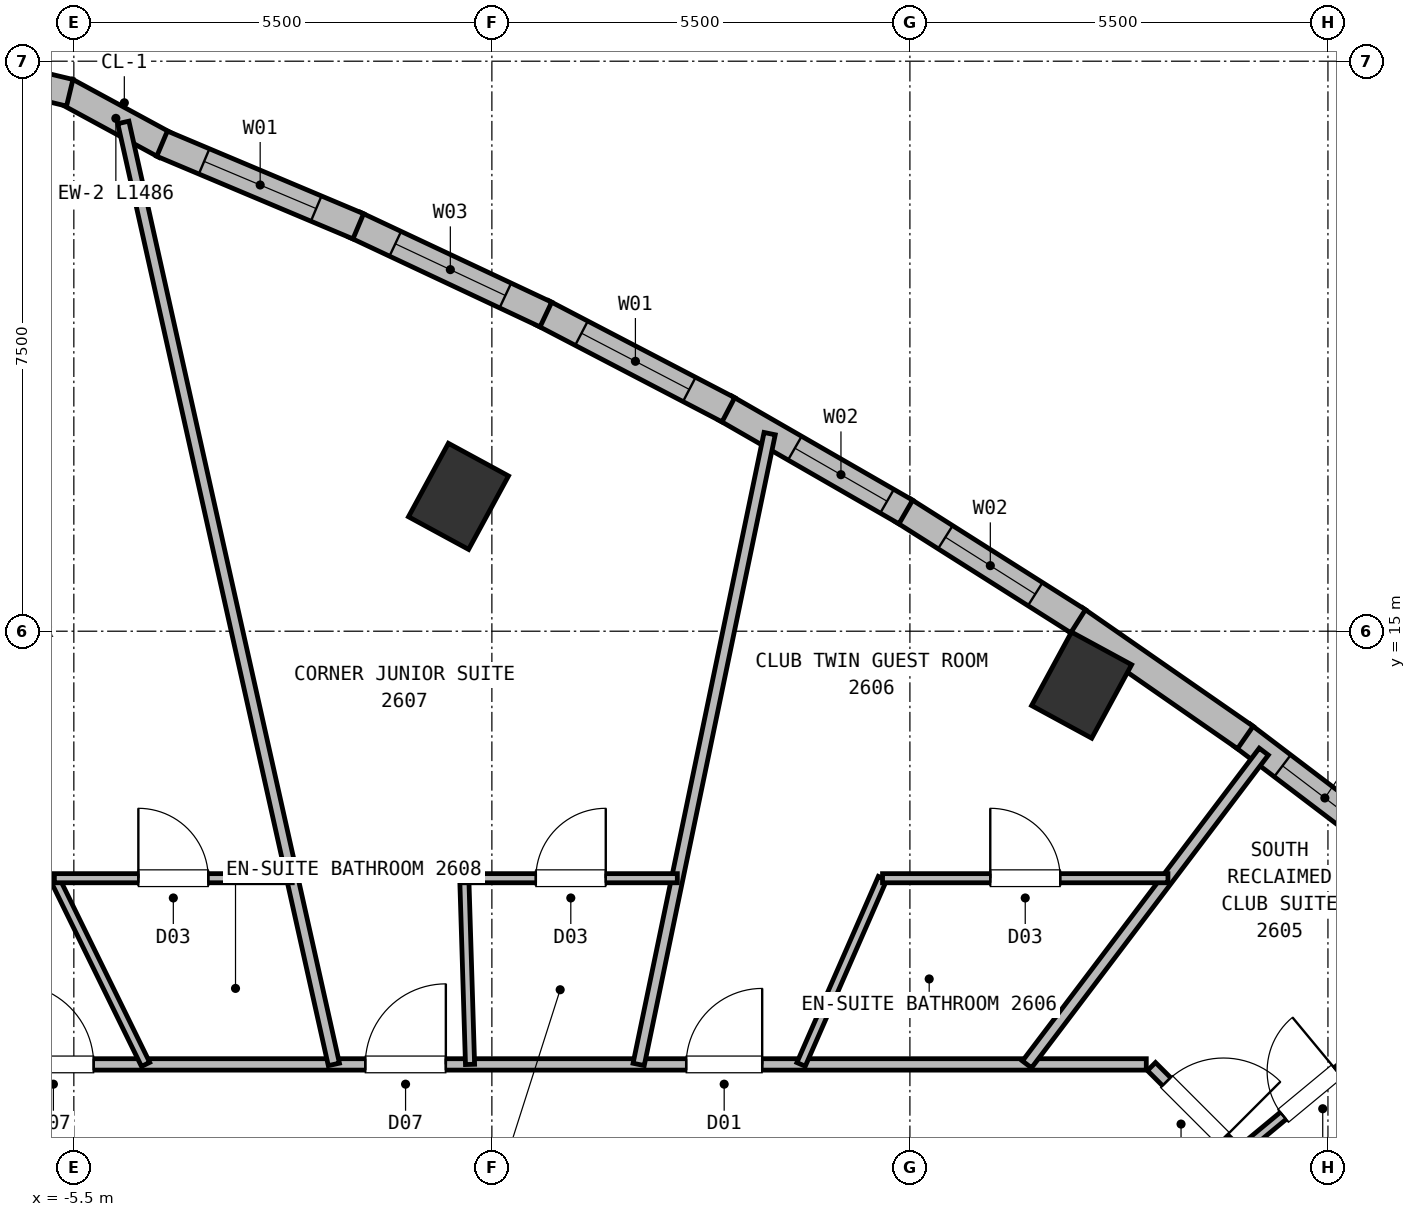
"""IFC4 building model, lengths in metres.
Left out: names, types, materials, properties, quantities, classifications, styles, units other than length and angle.
Written with IfcOpenShell. Run it as: python <this file> out.ifc"""

import sys

from ifc_helpers import new_model, si_unit, direction, frame, frame_2d, origin, origin_2d, place, context, subcontext, project, spatial, rectangle, extrude, element, fill, save


model = new_model("IFC4")
c1 = context("Model", 3, precision=1e-05, world=origin(), true_north=direction((0.0, 1.0)))
c2 = subcontext(c1, "Body", "Model", "MODEL_VIEW")
j1 = project(units=[si_unit("LENGTHUNIT", "METRE"), si_unit("PLANEANGLEUNIT", "RADIAN")], contexts=[c1])
p1 = place(None, origin())
s1 = spatial("IfcSite", under=j1, at=p1, CompositionType="ELEMENT")
p2 = place(p1, origin())
s2 = spatial("IfcBuilding", under=s1, at=p2, CompositionType="ELEMENT")
p3 = place(p2, frame((0.0, 0.0, 97.25)))
s3 = spatial("IfcBuildingStorey", under=s2, at=p3, CompositionType="ELEMENT", Elevation=97.25)
for number, where, z_axis, x_axis in (
    (1, (7.759, 14.29, 0.0), (0.0, 0.0, 1.0), (-0.879, 0.477, 0.0)),
    (2, (-0.439, 16.774, 0.0), (0.0, 0.0, 1.0), (-0.879, 0.477, 0.0)),
):
    element("IfcColumn", number, at=place(p3, frame(where, z_axis=z_axis, x_axis=x_axis)), inside=s3, PredefinedType="COLUMN", context=c2, shape_type="SweptSolid", body=[
        extrude(rectangle(XDim=0.9, YDim=1.1, at=origin_2d()), origin(), (0.0, 0.0, 1.0), 3.75),
    ])
for number, where, z_axis, x_axis in (
    (3, (-5.6, 22.102, 0.0), (0.0, 0.0, 1.0), (0.879, -0.477, 0.0)),
    (4, (-6.999, 22.431, 0.0), (0.0, 0.0, 1.0), (0.972, -0.233, 0.0)),
):
    element("IfcWall", number, at=place(p3, frame(where, z_axis=z_axis, x_axis=x_axis)), inside=s3, PredefinedType="SOLIDWALL", context=c2, shape_type="SweptSolid", body=[
        extrude(rectangle(XDim=1.486, YDim=0.36, at=frame_2d((0.743, 0.0))), origin(), (0.0, 0.0, 1.0), 3.5),
    ])
p4 = place(p3, frame((9.873, 13.631, 0.0), z_axis=(0.0, 0.0, 1.0), x_axis=(0.796336225349, -0.604854210696, 0.0)))
e5 = element("IfcWall", 5, at=p4, inside=s3, PredefinedType="SOLIDWALL", context=c2, shape_type="SweptSolid", body=[
    extrude(rectangle(XDim=2.73, YDim=0.36, at=frame_2d((1.365, 0.0))), origin(), (0.0, 0.0, 1.0), 3.5),
])
p5 = place(p4, frame((0.665, 0.0, 0.72)))
e6 = element("IfcOpeningElement", 6, at=p5, cuts=e5, PredefinedType="OPENING", context=c2, shape_type="SweptSolid", body=[
    extrude(rectangle(XDim=1.4, YDim=1.84, at=frame_2d((0.7, 0.92))), frame((0.0, 0.19, 0.0), z_axis=(0.0, -1.0, 0.0), x_axis=(1.0, 0.0, 0.0)), (0.0, 0.0, 1.0), 0.38),
])
p6 = place(p3, frame((7.671, 15.159, 0.0), z_axis=(0.0, 0.0, 1.0), x_axis=(0.821331552378, -0.570451120665, 0.0)))
e7 = element("IfcWall", 7, at=p6, inside=s3, PredefinedType="SOLIDWALL", context=c2, shape_type="SweptSolid", body=[
    extrude(rectangle(XDim=2.73, YDim=0.36, at=frame_2d((1.365, 0.0))), origin(), (0.0, 0.0, 1.0), 3.5),
])
p7 = place(p3, frame((5.403, 16.594, 0.0), z_axis=(0.0, 0.0, 1.0), x_axis=(0.844802931873, -0.535077570357, 0.0)))
e8 = element("IfcWall", 8, at=p7, inside=s3, PredefinedType="SOLIDWALL", context=c2, shape_type="SweptSolid", body=[
    extrude(rectangle(XDim=2.734, YDim=0.36, at=frame_2d((1.367, 0.0))), origin(), (0.0, 0.0, 1.0), 3.5),
])
p8 = place(p7, frame((0.667, 0.0, 0.72)))
e9 = element("IfcOpeningElement", 9, at=p8, cuts=e8, PredefinedType="OPENING", context=c2, shape_type="SweptSolid", body=[
    extrude(rectangle(XDim=1.4, YDim=1.84, at=frame_2d((0.7, 0.92))), frame((0.0, 0.19, 0.0), z_axis=(0.0, -1.0, 0.0), x_axis=(1.0, 0.0, 0.0)), (0.0, 0.0, 1.0), 0.38),
])
p9 = place(p3, frame((3.068, 17.938, 0.0), z_axis=(0.0, 0.0, 1.0), x_axis=(0.866601472799, -0.499000889121, 0.0)))
e10 = element("IfcWall", 10, at=p9, inside=s3, PredefinedType="SOLIDWALL", context=c2, shape_type="SweptSolid", body=[
    extrude(rectangle(XDim=2.744, YDim=0.36, at=frame_2d((1.372, 0.0))), origin(), (0.0, 0.0, 1.0), 3.5),
])
p10 = place(p9, frame((1.06, 0.0, 0.72)))
e11 = element("IfcOpeningElement", 11, at=p10, cuts=e10, PredefinedType="OPENING", context=c2, shape_type="SweptSolid", body=[
    extrude(rectangle(XDim=1.4, YDim=1.84, at=frame_2d((0.7, 0.92))), frame((0.0, 0.19, 0.0), z_axis=(0.0, -1.0, 0.0), x_axis=(1.0, 0.0, 0.0)), (0.0, 0.0, 1.0), 0.38),
])
p11 = place(p3, frame((0.666, 19.189, 0.0), z_axis=(0.0, 0.0, 1.0), x_axis=(0.886704748188, -0.462336121822, 0.0)))
e12 = element("IfcWall", 12, at=p11, inside=s3, PredefinedType="SOLIDWALL", context=c2, shape_type="SweptSolid", body=[
    extrude(rectangle(XDim=2.759, YDim=0.36, at=frame_2d((1.379, 0.0))), origin(), (0.0, 0.0, 1.0), 3.5),
])
p12 = place(p11, frame((0.579, 0.0, 0.72)))
e13 = element("IfcOpeningElement", 13, at=p12, cuts=e12, PredefinedType="OPENING", context=c2, shape_type="SweptSolid", body=[
    extrude(rectangle(XDim=1.6, YDim=1.88, at=frame_2d((0.8, 0.94))), frame((0.0, 0.19, 0.0), z_axis=(0.0, -1.0, 0.0), x_axis=(1.0, 0.0, 0.0)), (0.0, 0.0, 1.0), 0.38),
])
p13 = place(p3, frame((-1.803, 20.348, 0.0), z_axis=(0.0, 0.0, 1.0), x_axis=(0.905061598697, -0.425280498688, 0.0)))
e14 = element("IfcWall", 14, at=p13, inside=s3, PredefinedType="SOLIDWALL", context=c2, shape_type="SweptSolid", body=[
    extrude(rectangle(XDim=2.777, YDim=0.36, at=frame_2d((1.389, 0.0))), origin(), (0.0, 0.0, 1.0), 3.5),
])
p14 = place(p13, frame((0.589, 0.0, 0.72)))
e15 = element("IfcOpeningElement", 15, at=p14, cuts=e14, PredefinedType="OPENING", context=c2, shape_type="SweptSolid", body=[
    extrude(rectangle(XDim=1.6, YDim=1.88, at=frame_2d((0.8, 0.94))), frame((0.0, 0.19, 0.0), z_axis=(0.0, -1.0, 0.0), x_axis=(1.0, 0.0, 0.0)), (0.0, 0.0, 1.0), 0.38),
])
p15 = place(p3, frame((-4.339, 21.415, 0.0), z_axis=(0.0, 0.0, 1.0), x_axis=(0.921579586259, -0.388189472025, 0.0)))
e16 = element("IfcWall", 16, at=p15, inside=s3, PredefinedType="SOLIDWALL", context=c2, shape_type="SweptSolid", body=[
    extrude(rectangle(XDim=2.801, YDim=0.36, at=frame_2d((1.401, 0.0))), origin(), (0.0, 0.0, 1.0), 3.5),
])
p16 = place(p15, frame((0.601, 0.0, 0.72)))
e17 = element("IfcOpeningElement", 17, at=p16, cuts=e16, PredefinedType="OPENING", context=c2, shape_type="SweptSolid", body=[
    extrude(rectangle(XDim=1.6, YDim=1.88, at=frame_2d((0.8, 0.94))), frame((0.0, 0.19, 0.0), z_axis=(0.0, -1.0, 0.0), x_axis=(1.0, 0.0, 0.0)), (0.0, 0.0, 1.0), 0.38),
])
p17 = place(p3, frame((8.678, 9.272, 0.0), z_axis=(0.0, 0.0, 1.0), x_axis=(0.707106781187, -0.707106781187, 0.0)))
e18 = element("IfcWall", 18, at=p17, inside=s3, PredefinedType="PARTITIONING", context=c2, shape_type="SweptSolid", body=[
    extrude(rectangle(XDim=2.89, YDim=0.15, at=frame_2d((1.445, 0.0))), origin(), (0.0, 0.0, 1.0), 3.5),
])
p18 = place(p17, frame((0.28, 0.0, 0.0)))
e19 = element("IfcOpeningElement", 19, at=p18, cuts=e18, PredefinedType="OPENING", context=c2, shape_type="SweptSolid", body=[
    extrude(rectangle(XDim=1.06, YDim=2.15, at=frame_2d((0.53, 1.075))), frame((0.0, 0.085, 0.0), z_axis=(0.0, -1.0, 0.0), x_axis=(1.0, 0.0, 0.0)), (0.0, 0.0, 1.0), 0.17),
])
p19 = place(p3, frame((-8.61, 9.3, 0.0), z_axis=(0.0, 0.0, 1.0), x_axis=(1.0, 0.0, 0.0)))
e20 = element("IfcWall", 20, at=p19, inside=s3, PredefinedType="PARTITIONING", context=c2, shape_type="SweptSolid", body=[
    extrude(rectangle(XDim=17.22, YDim=0.15, at=frame_2d((8.61, 0.0))), origin(), (0.0, 0.0, 1.0), 3.5),
])
p20 = place(p19, frame((11.167, 0.0, 0.0)))
e21 = element("IfcOpeningElement", 21, at=p20, cuts=e20, PredefinedType="OPENING", context=c2, shape_type="SweptSolid", body=[
    extrude(rectangle(XDim=1.0, YDim=2.15, at=frame_2d((0.5, 1.075))), frame((0.0, 0.085, 0.0), z_axis=(0.0, -1.0, 0.0), x_axis=(1.0, 0.0, 0.0)), (0.0, 0.0, 1.0), 0.17),
])
p21 = place(p19, frame((6.944, 0.0, 0.0)))
e22 = element("IfcOpeningElement", 22, at=p21, cuts=e20, PredefinedType="OPENING", context=c2, shape_type="SweptSolid", body=[
    extrude(rectangle(XDim=1.06, YDim=2.15, at=frame_2d((0.53, 1.075))), frame((0.0, 0.085, 0.0), z_axis=(0.0, -1.0, 0.0), x_axis=(1.0, 0.0, 0.0)), (0.0, 0.0, 1.0), 0.17),
])
p22 = place(p19, frame((2.311, 0.0, 0.0)))
e23 = element("IfcOpeningElement", 23, at=p22, cuts=e20, PredefinedType="OPENING", context=c2, shape_type="SweptSolid", body=[
    extrude(rectangle(XDim=1.06, YDim=2.15, at=frame_2d((0.53, 1.075))), frame((0.0, 0.085, 0.0), z_axis=(0.0, -1.0, 0.0), x_axis=(1.0, 0.0, 0.0)), (0.0, 0.0, 1.0), 0.17),
])
p23 = place(p3, frame((9.818, 8.132, 0.0), z_axis=(0.0, 0.0, 1.0), x_axis=(0.770088402747, 0.63793718496, 0.0)))
e24 = element("IfcWall", 24, at=p23, inside=s3, PredefinedType="PARTITIONING", context=c2, shape_type="SweptSolid", body=[
    extrude(rectangle(XDim=2.461, YDim=0.12, at=frame_2d((1.23, 0.0))), origin(), (0.0, 0.0, 1.0), 3.5),
])
p24 = place(p23, frame((0.771, 0.0, 0.0)))
e25 = element("IfcOpeningElement", 25, at=p24, cuts=e24, PredefinedType="OPENING", context=c2, shape_type="SweptSolid", body=[
    extrude(rectangle(XDim=0.92, YDim=2.1, at=frame_2d((0.46, 1.05))), frame((0.0, 0.07, 0.0), z_axis=(0.0, -1.0, 0.0), x_axis=(1.0, 0.0, 0.0)), (0.0, 0.0, 1.0), 0.14),
])
p25 = place(p3, frame((7.04, 9.3, 0.0), z_axis=(0.0, 0.0, 1.0), x_axis=(0.603580834167, 0.797301810249, 0.0)))
e26 = element("IfcWall", 26, at=p25, inside=s3, PredefinedType="PARTITIONING", context=c2, shape_type="SweptSolid", body=[
    extrude(rectangle(XDim=5.162, YDim=0.15, at=frame_2d((2.581, 0.0))), origin(), (0.0, 0.0, 1.0), 3.5),
])
p26 = place(p3, frame((4.068, 9.3, 0.0), z_axis=(0.0, 0.0, 1.0), x_axis=(0.400794887066, 0.916167811322, 0.0)))
e27 = element("IfcWall", 27, at=p26, inside=s3, PredefinedType="PARTITIONING", context=c2, shape_type="SweptSolid", body=[
    extrude(rectangle(XDim=2.674, YDim=0.12, at=frame_2d((1.337, 0.0))), origin(), (0.0, 0.0, 1.0), 3.5),
])
p27 = place(p3, frame((5.14, 11.75, 0.0), z_axis=(0.0, 0.0, 1.0), x_axis=(1.0, 0.0, 0.0)))
e28 = element("IfcWall", 28, at=p27, inside=s3, PredefinedType="PARTITIONING", context=c2, shape_type="SweptSolid", body=[
    extrude(rectangle(XDim=3.755, YDim=0.12, at=frame_2d((1.877, 0.0))), origin(), (0.0, 0.0, 1.0), 3.5),
])
p28 = place(p27, frame((1.417, 0.0, 0.0)))
e29 = element("IfcOpeningElement", 29, at=p28, cuts=e28, PredefinedType="OPENING", context=c2, shape_type="SweptSolid", body=[
    extrude(rectangle(XDim=0.92, YDim=2.1, at=frame_2d((0.46, 1.05))), frame((0.0, 0.07, 0.0), z_axis=(0.0, -1.0, 0.0), x_axis=(1.0, 0.0, 0.0)), (0.0, 0.0, 1.0), 0.14),
])
p29 = place(p3, frame((1.931, 9.3, 0.0), z_axis=(0.0, 0.0, 1.0), x_axis=(0.203305542184, 0.979115343827, 0.0)))
e30 = element("IfcWall", 30, at=p29, inside=s3, PredefinedType="PARTITIONING", context=c2, shape_type="SweptSolid", body=[
    extrude(rectangle(XDim=8.477, YDim=0.15, at=frame_2d((4.238, 0.0))), origin(), (0.0, 0.0, 1.0), 3.5),
])
p30 = place(p3, frame((-0.287, 9.3, 0.0), z_axis=(0.0, 0.0, 1.0), x_axis=(-0.030877148781, 0.999523187166, 0.0)))
e31 = element("IfcWall", 31, at=p30, inside=s3, PredefinedType="PARTITIONING", context=c2, shape_type="SweptSolid", body=[
    extrude(rectangle(XDim=2.451, YDim=0.12, at=frame_2d((1.226, 0.0))), origin(), (0.0, 0.0, 1.0), 3.5),
])
p31 = place(p3, frame((-0.363, 11.75, 0.0), z_axis=(0.0, 0.0, 1.0), x_axis=(1.0, 0.0, 0.0)))
e32 = element("IfcWall", 32, at=p31, inside=s3, PredefinedType="PARTITIONING", context=c2, shape_type="SweptSolid", body=[
    extrude(rectangle(XDim=2.803, YDim=0.12, at=frame_2d((1.401, 0.0))), origin(), (0.0, 0.0, 1.0), 3.5),
])
p32 = place(p31, frame((0.941, 0.0, 0.0)))
e33 = element("IfcOpeningElement", 33, at=p32, cuts=e32, PredefinedType="OPENING", context=c2, shape_type="SweptSolid", body=[
    extrude(rectangle(XDim=0.92, YDim=2.1, at=frame_2d((0.46, 1.05))), frame((0.0, 0.07, 0.0), z_axis=(0.0, -1.0, 0.0), x_axis=(1.0, 0.0, 0.0)), (0.0, 0.0, 1.0), 0.14),
])
p33 = place(p3, frame((-2.079, 9.3, 0.0), z_axis=(0.0, 0.0, 1.0), x_axis=(-0.218143379007, 0.975916731179, 0.0)))
e34 = element("IfcWall", 34, at=p33, inside=s3, PredefinedType="PARTITIONING", context=c2, shape_type="SweptSolid", body=[
    extrude(rectangle(XDim=12.7, YDim=0.15, at=frame_2d((6.35, 0.0))), origin(), (0.0, 0.0, 1.0), 3.5),
])
p34 = place(p3, frame((-5.756, 11.75, 0.0), z_axis=(0.0, 0.0, 1.0), x_axis=(0.439932257938, -0.898030961841, 0.0)))
e35 = element("IfcWall", 35, at=p34, inside=s3, PredefinedType="PARTITIONING", context=c2, shape_type="SweptSolid", body=[
    extrude(rectangle(XDim=2.728, YDim=0.12, at=frame_2d((1.364, 0.0))), origin(), (0.0, 0.0, 1.0), 3.5),
])
p35 = place(p3, frame((-5.756, 11.75, 0.0), z_axis=(0.0, 0.0, 1.0), x_axis=(1.0, 0.0, 0.0)))
e36 = element("IfcWall", 36, at=p35, inside=s3, PredefinedType="PARTITIONING", context=c2, shape_type="SweptSolid", body=[
    extrude(rectangle(XDim=3.13, YDim=0.12, at=frame_2d((1.565, 0.0))), origin(), (0.0, 0.0, 1.0), 3.5),
])
p36 = place(p35, frame((1.105, 0.0, 0.0)))
e37 = element("IfcOpeningElement", 37, at=p36, cuts=e36, PredefinedType="OPENING", context=c2, shape_type="SweptSolid", body=[
    extrude(rectangle(XDim=0.92, YDim=2.1, at=frame_2d((0.46, 1.05))), frame((0.0, 0.07, 0.0), z_axis=(0.0, -1.0, 0.0), x_axis=(1.0, 0.0, 0.0)), (0.0, 0.0, 1.0), 0.14),
])
p37 = place(p5, origin())
e38 = element("IfcWindow", 38, at=p37, inside=s3, PartitioningType="SINGLE_PANEL", PredefinedType="WINDOW", context=c2, shape_type="SweptSolid", body=[
    extrude(rectangle(XDim=1.4, YDim=1.84, at=frame_2d((0.7, 0.92))), frame((0.0, 0.03, 0.0), z_axis=(0.0, -1.0, 0.0), x_axis=(1.0, 0.0, 0.0)), (0.0, 0.0, 1.0), 0.06),
])
fill(e6, e38)
p38 = place(p8, origin())
e39 = element("IfcWindow", 39, at=p38, inside=s3, PartitioningType="SINGLE_PANEL", PredefinedType="WINDOW", context=c2, shape_type="SweptSolid", body=[
    extrude(rectangle(XDim=1.4, YDim=1.84, at=frame_2d((0.7, 0.92))), frame((0.0, 0.03, 0.0), z_axis=(0.0, -1.0, 0.0), x_axis=(1.0, 0.0, 0.0)), (0.0, 0.0, 1.0), 0.06),
])
fill(e9, e39)
p39 = place(p10, origin())
e40 = element("IfcWindow", 40, at=p39, inside=s3, PartitioningType="SINGLE_PANEL", PredefinedType="WINDOW", context=c2, shape_type="SweptSolid", body=[
    extrude(rectangle(XDim=1.4, YDim=1.84, at=frame_2d((0.7, 0.92))), frame((0.0, 0.03, 0.0), z_axis=(0.0, -1.0, 0.0), x_axis=(1.0, 0.0, 0.0)), (0.0, 0.0, 1.0), 0.06),
])
fill(e11, e40)
p40 = place(p12, origin())
e41 = element("IfcWindow", 41, at=p40, inside=s3, PartitioningType="SINGLE_PANEL", PredefinedType="WINDOW", context=c2, shape_type="SweptSolid", body=[
    extrude(rectangle(XDim=1.6, YDim=1.88, at=frame_2d((0.8, 0.94))), frame((0.0, 0.03, 0.0), z_axis=(0.0, -1.0, 0.0), x_axis=(1.0, 0.0, 0.0)), (0.0, 0.0, 1.0), 0.06),
])
fill(e13, e41)
p41 = place(p14, origin())
e42 = element("IfcWindow", 42, at=p41, inside=s3, PartitioningType="SINGLE_PANEL", PredefinedType="WINDOW", context=c2, shape_type="SweptSolid", body=[
    extrude(rectangle(XDim=1.6, YDim=1.88, at=frame_2d((0.8, 0.94))), frame((0.0, 0.03, 0.0), z_axis=(0.0, -1.0, 0.0), x_axis=(1.0, 0.0, 0.0)), (0.0, 0.0, 1.0), 0.06),
])
fill(e15, e42)
p42 = place(p16, origin())
e43 = element("IfcWindow", 43, at=p42, inside=s3, PartitioningType="SINGLE_PANEL", PredefinedType="WINDOW", context=c2, shape_type="SweptSolid", body=[
    extrude(rectangle(XDim=1.6, YDim=1.88, at=frame_2d((0.8, 0.94))), frame((0.0, 0.03, 0.0), z_axis=(0.0, -1.0, 0.0), x_axis=(1.0, 0.0, 0.0)), (0.0, 0.0, 1.0), 0.06),
])
fill(e17, e43)
p43 = place(p24, origin())
e44 = element("IfcDoor", 44, at=p43, inside=s3, OperationType="SINGLE_SWING_RIGHT", PredefinedType="DOOR", context=c2, shape_type="SweptSolid", body=[
    extrude(rectangle(XDim=0.92, YDim=2.1, at=frame_2d((0.46, 1.05))), frame((0.0, 0.025, 0.0), z_axis=(0.0, -1.0, 0.0), x_axis=(1.0, 0.0, 0.0)), (0.0, 0.0, 1.0), 0.05),
])
fill(e25, e44)
p44 = place(p28, origin())
e45 = element("IfcDoor", 45, at=p44, inside=s3, OperationType="SINGLE_SWING_LEFT", PredefinedType="DOOR", context=c2, shape_type="SweptSolid", body=[
    extrude(rectangle(XDim=0.92, YDim=2.1, at=frame_2d((0.46, 1.05))), frame((0.0, 0.025, 0.0), z_axis=(0.0, -1.0, 0.0), x_axis=(1.0, 0.0, 0.0)), (0.0, 0.0, 1.0), 0.05),
])
fill(e29, e45)
p45 = place(p32, origin())
e46 = element("IfcDoor", 46, at=p45, inside=s3, OperationType="SINGLE_SWING_RIGHT", PredefinedType="DOOR", context=c2, shape_type="SweptSolid", body=[
    extrude(rectangle(XDim=0.92, YDim=2.1, at=frame_2d((0.46, 1.05))), frame((0.0, 0.025, 0.0), z_axis=(0.0, -1.0, 0.0), x_axis=(1.0, 0.0, 0.0)), (0.0, 0.0, 1.0), 0.05),
])
fill(e33, e46)
p46 = place(p36, origin())
e47 = element("IfcDoor", 47, at=p46, inside=s3, OperationType="SINGLE_SWING_LEFT", PredefinedType="DOOR", context=c2, shape_type="SweptSolid", body=[
    extrude(rectangle(XDim=0.92, YDim=2.1, at=frame_2d((0.46, 1.05))), frame((0.0, 0.025, 0.0), z_axis=(0.0, -1.0, 0.0), x_axis=(1.0, 0.0, 0.0)), (0.0, 0.0, 1.0), 0.05),
])
fill(e37, e47)
p47 = place(p18, origin())
e48 = element("IfcDoor", 48, at=p47, inside=s3, OperationType="SINGLE_SWING_RIGHT", PredefinedType="DOOR", context=c2, shape_type="SweptSolid", body=[
    extrude(rectangle(XDim=1.06, YDim=2.15, at=frame_2d((0.53, 1.075))), frame((0.0, 0.025, 0.0), z_axis=(0.0, -1.0, 0.0), x_axis=(1.0, 0.0, 0.0)), (0.0, 0.0, 1.0), 0.05),
])
fill(e19, e48)
p48 = place(p20, origin())
e49 = element("IfcDoor", 49, at=p48, inside=s3, OperationType="SINGLE_SWING_RIGHT", PredefinedType="DOOR", context=c2, shape_type="SweptSolid", body=[
    extrude(rectangle(XDim=1.0, YDim=2.15, at=frame_2d((0.5, 1.075))), frame((0.0, 0.025, 0.0), z_axis=(0.0, -1.0, 0.0), x_axis=(1.0, 0.0, 0.0)), (0.0, 0.0, 1.0), 0.05),
])
fill(e21, e49)
p49 = place(p21, origin())
e50 = element("IfcDoor", 50, at=p49, inside=s3, OperationType="SINGLE_SWING_RIGHT", PredefinedType="DOOR", context=c2, shape_type="SweptSolid", body=[
    extrude(rectangle(XDim=1.06, YDim=2.15, at=frame_2d((0.53, 1.075))), frame((0.0, 0.025, 0.0), z_axis=(0.0, -1.0, 0.0), x_axis=(1.0, 0.0, 0.0)), (0.0, 0.0, 1.0), 0.05),
])
fill(e22, e50)
p50 = place(p22, origin())
e51 = element("IfcDoor", 51, at=p50, inside=s3, OperationType="SINGLE_SWING_LEFT", PredefinedType="DOOR", context=c2, shape_type="SweptSolid", body=[
    extrude(rectangle(XDim=1.06, YDim=2.15, at=frame_2d((0.53, 1.075))), frame((0.0, 0.025, 0.0), z_axis=(0.0, -1.0, 0.0), x_axis=(1.0, 0.0, 0.0)), (0.0, 0.0, 1.0), 0.05),
])
fill(e23, e51)
save(model, sys.argv[1])
